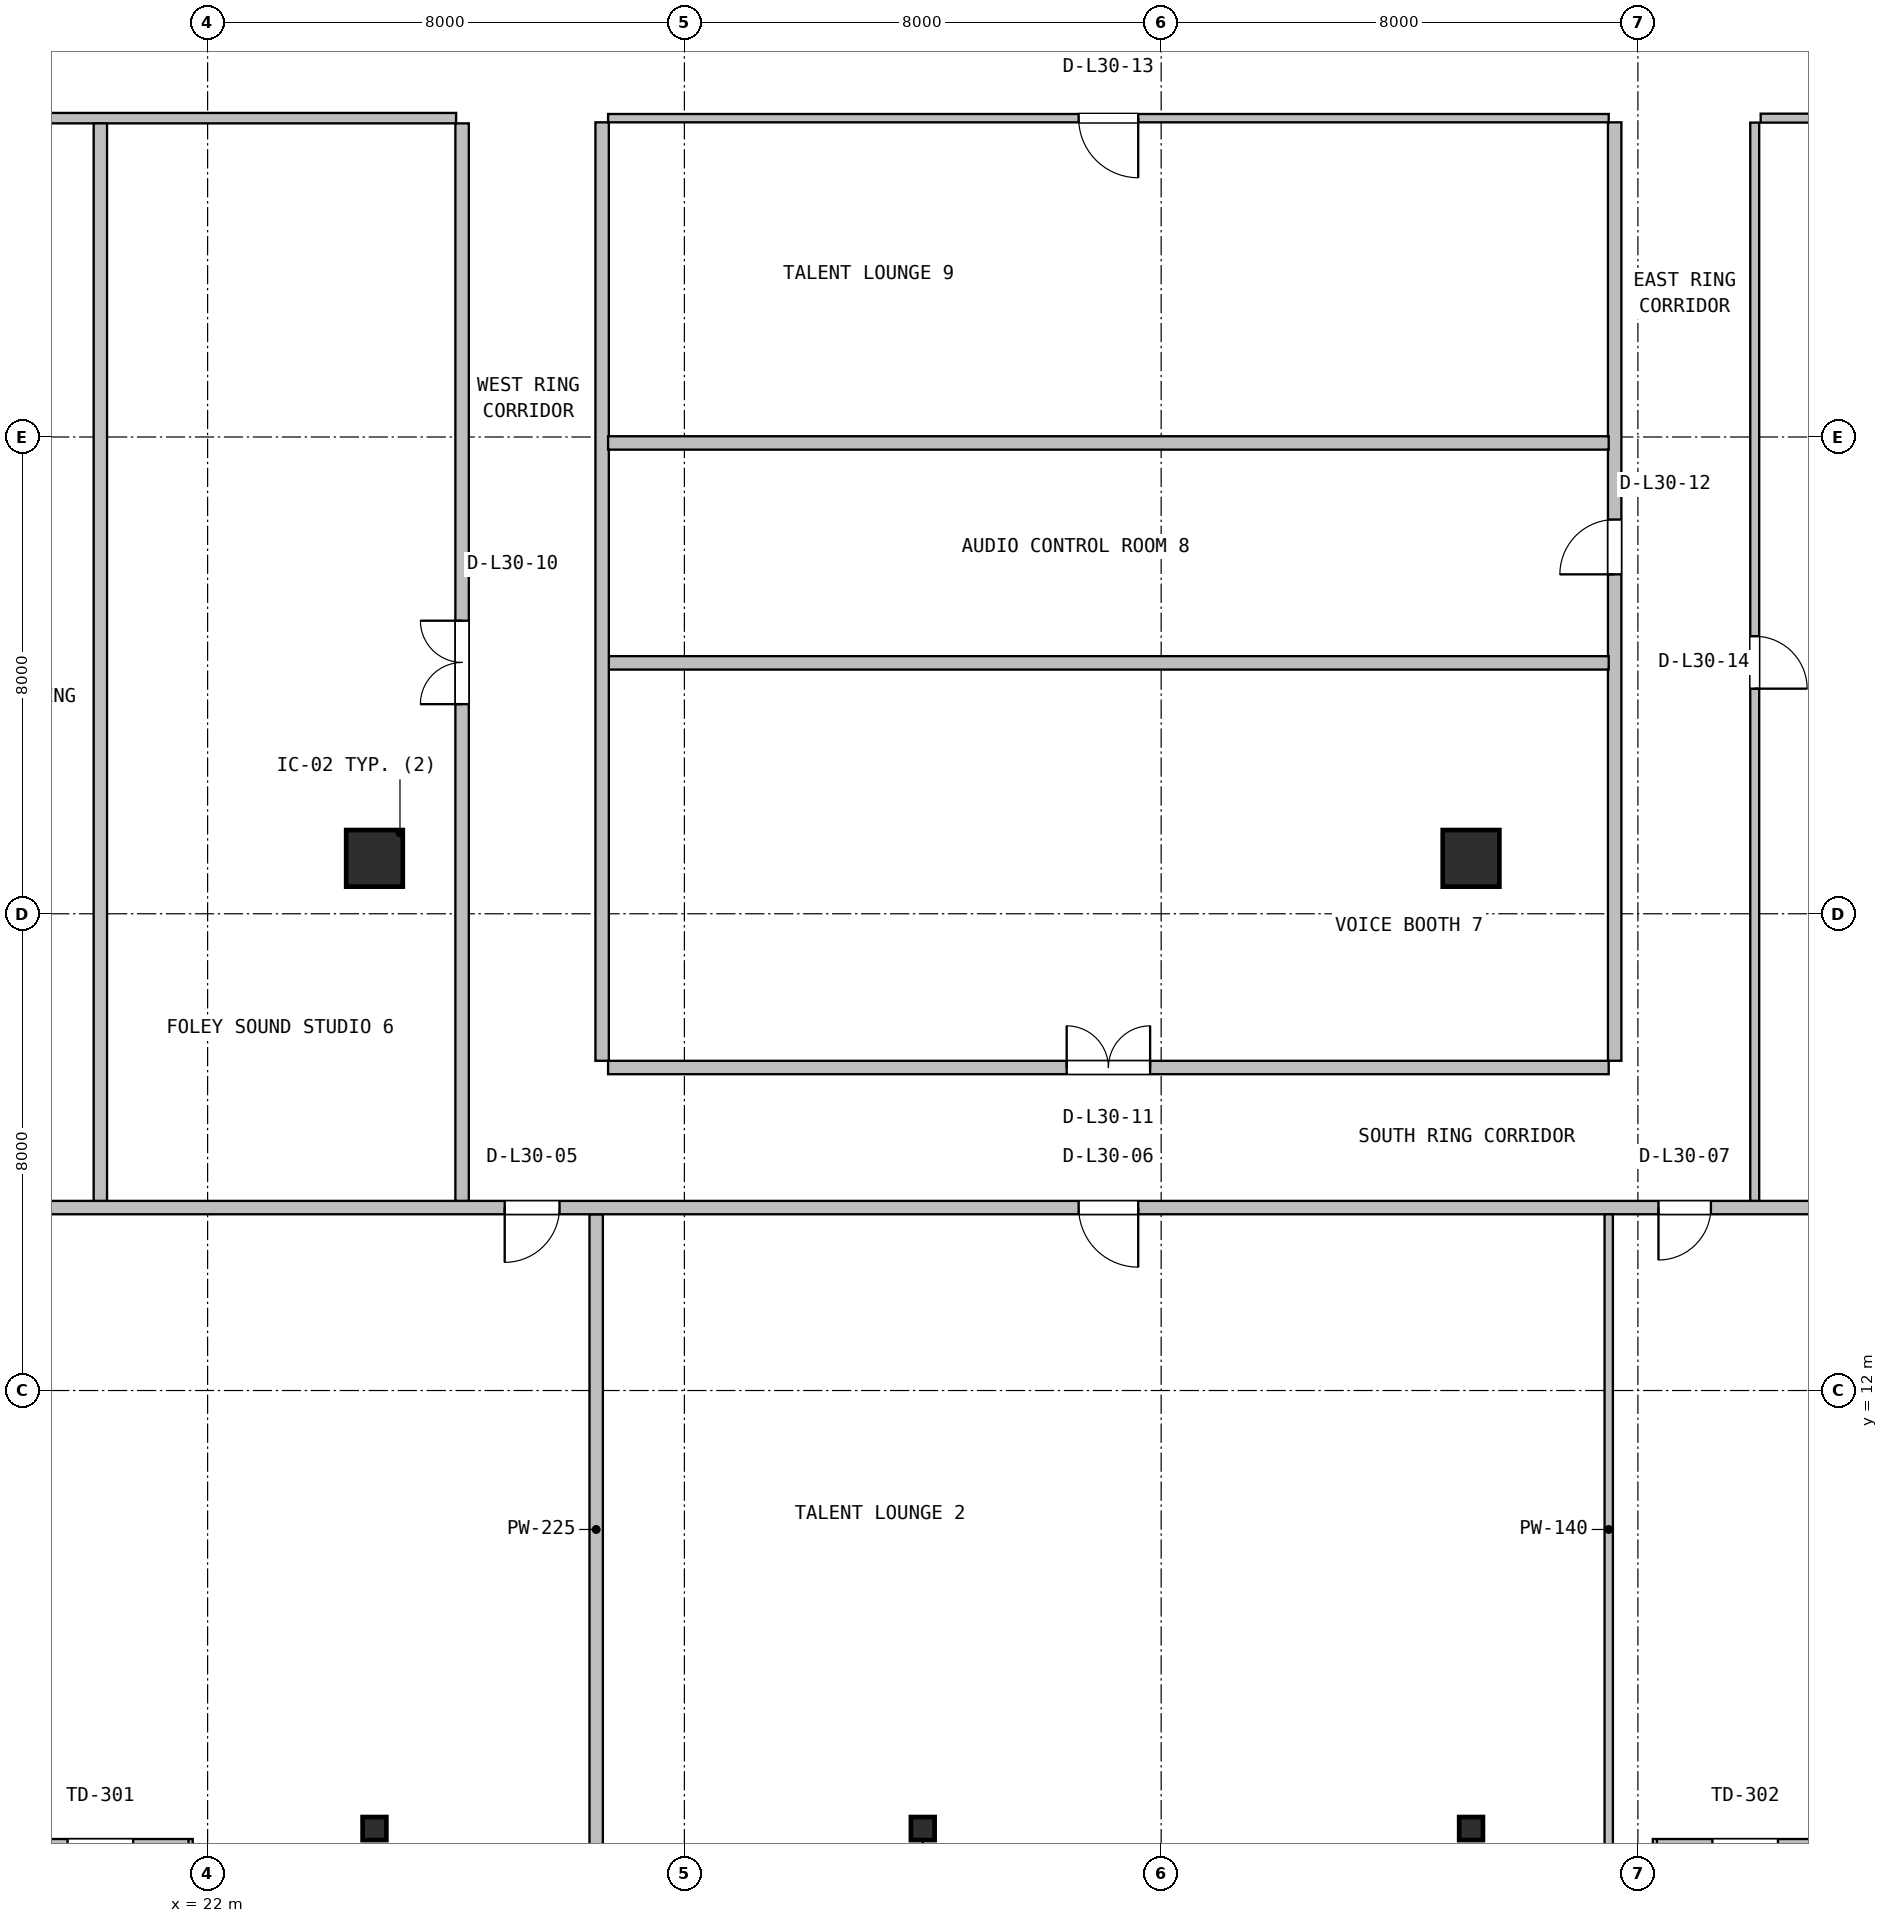
"""IFC4 building model, lengths in metres.
Left out: names, types, materials, properties, quantities, classifications, styles, units other than length and angle.
Written with IfcOpenShell. Run it as: python <this file> out.ifc"""

import sys

from ifc_helpers import new_model, si_unit, direction, frame, frame_2d, origin, origin_2d, place, context, subcontext, project, spatial, rectangle, i_section, extrude, source, transform, mapped, element, fill, save


model = new_model("IFC4")
c1 = context("Model", 3, precision=1e-05, world=origin(), true_north=direction((0.0, 1.0)))
c2 = subcontext(c1, "Body", "Model", "MODEL_VIEW")
j1 = project(units=[si_unit("LENGTHUNIT", "METRE"), si_unit("PLANEANGLEUNIT", "RADIAN")], contexts=[c1])
p1 = place(None, origin())
s1 = spatial("IfcSite", under=j1, at=p1, CompositionType="ELEMENT")
p2 = place(p1, origin())
s2 = spatial("IfcBuilding", under=s1, at=p2, CompositionType="ELEMENT")
p3 = place(p2, frame((0.0, 0.0, 125.8)))
s3 = spatial("IfcBuildingStorey", under=s2, at=p3, CompositionType="ELEMENT", Elevation=125.8)
m1 = source(origin(), c2, "Body", "SweptSolid", [
    extrude(i_section(OverallWidth=0.398, OverallDepth=0.387, WebThickness=0.021, FlangeThickness=0.033, FilletRadius=0.018, at=origin_2d()), origin(), (0.0, 0.0, 1.0), 3.8),
])
for number, where, z_axis, x_axis in (
    (1, (24.8, 4.65, 0.0), (0.0, 0.0, 1.0), (1.0, 0.0, 0.0)),
    (2, (34.0, 4.65, 0.0), (0.0, 0.0, 1.0), (1.0, 0.0, 0.0)),
    (3, (43.2, 4.65, 0.0), (0.0, 0.0, 1.0), (1.0, 0.0, 0.0)),
):
    element("IfcColumn", number, at=place(p3, frame(where, z_axis=z_axis, x_axis=x_axis)), inside=s3, PredefinedType="COLUMN", context=c2, shape_type="MappedRepresentation", body=[
        mapped(m1, transform((0.0, 0.0, 0.0), x_axis=(1.0, 0.0, 0.0), y_axis=(0.0, 1.0, 0.0), z_axis=(0.0, 0.0, 1.0), scale=1.0)),
    ])
m2 = source(origin(), c2, "Body", "SweptSolid", [
    extrude(rectangle(XDim=0.95, YDim=0.95, at=origin_2d()), origin(), (0.0, 0.0, 1.0), 3.8),
])
for number, where, z_axis, x_axis in (
    (4, (24.8, 20.93, 0.0), (0.0, 0.0, 1.0), (1.0, 0.0, 0.0)),
    (5, (43.2, 20.93, 0.0), (0.0, 0.0, 1.0), (1.0, 0.0, 0.0)),
):
    element("IfcColumn", number, at=place(p3, frame(where, z_axis=z_axis, x_axis=x_axis)), inside=s3, PredefinedType="COLUMN", context=c2, shape_type="MappedRepresentation", body=[
        mapped(m2, transform((0.0, 0.0, 0.0), x_axis=(1.0, 0.0, 0.0), y_axis=(0.0, 1.0, 0.0), z_axis=(0.0, 0.0, 1.0), scale=1.0)),
    ])
p4 = place(p3, frame((18.65, 4.35, 0.0), z_axis=(0.0, 0.0, 1.0), x_axis=(1.0, 0.0, 0.0)))
e6 = element("IfcWall", 6, at=p4, inside=s3, PredefinedType="SOLIDWALL", context=c2, shape_type="SweptSolid", body=[
    extrude(rectangle(XDim=3.1, YDim=0.25, at=frame_2d((1.55, 0.0))), origin(), (0.0, 0.0, 1.0), 3.53),
])
p5 = place(p4, frame((1.0, 0.0, 0.0)))
e7 = element("IfcOpeningElement", 7, at=p5, cuts=e6, PredefinedType="OPENING", context=c2, shape_type="SweptSolid", body=[
    extrude(rectangle(XDim=1.1, YDim=2.15, at=frame_2d((0.55, 1.075))), frame((0.0, 0.135, 0.0), z_axis=(0.0, -1.0, 0.0), x_axis=(1.0, 0.0, 0.0)), (0.0, 0.0, 1.0), 0.27),
])
p6 = place(p3, frame((46.25, 4.35, 0.0), z_axis=(0.0, 0.0, 1.0), x_axis=(1.0, 0.0, 0.0)))
e8 = element("IfcWall", 8, at=p6, inside=s3, PredefinedType="SOLIDWALL", context=c2, shape_type="SweptSolid", body=[
    extrude(rectangle(XDim=3.1, YDim=0.25, at=frame_2d((1.55, 0.0))), origin(), (0.0, 0.0, 1.0), 3.53),
])
p7 = place(p6, frame((1.0, 0.0, 0.0)))
e9 = element("IfcOpeningElement", 9, at=p7, cuts=e8, PredefinedType="OPENING", context=c2, shape_type="SweptSolid", body=[
    extrude(rectangle(XDim=1.1, YDim=2.15, at=frame_2d((0.55, 1.075))), frame((0.0, 0.135, 0.0), z_axis=(0.0, -1.0, 0.0), x_axis=(1.0, 0.0, 0.0)), (0.0, 0.0, 1.0), 0.27),
])
p8 = place(p3, frame((28.52, 4.38, 0.0), z_axis=(0.0, 0.0, 1.0), x_axis=(0.0, 1.0, 0.0)))
e10 = element("IfcWall", 10, at=p8, inside=s3, PredefinedType="PARTITIONING", context=c2, shape_type="SweptSolid", body=[
    extrude(rectangle(XDim=10.577, YDim=0.225, at=frame_2d((5.289, 0.0))), origin(), (0.0, 0.0, 1.0), 3.108),
])
p9 = place(p3, frame((4.68, 15.07, 0.0), z_axis=(0.0, 0.0, 1.0), x_axis=(1.0, 0.0, 0.0)))
e11 = element("IfcWall", 11, at=p9, inside=s3, PredefinedType="PARTITIONING", context=c2, shape_type="SweptSolid", body=[
    extrude(rectangle(XDim=58.64, YDim=0.225, at=frame_2d((29.32, 0.0))), origin(), (0.0, 0.0, 1.0), 2.83),
])
p10 = place(p9, frame((22.305, 0.0, 0.0)))
e12 = element("IfcOpeningElement", 12, at=p10, cuts=e11, PredefinedType="OPENING", context=c2, shape_type="SweptSolid", body=[
    extrude(rectangle(XDim=0.92, YDim=2.08, at=frame_2d((0.46, 1.04))), frame((0.0, 0.123, 0.0), z_axis=(0.0, -1.0, 0.0), x_axis=(1.0, 0.0, 0.0)), (0.0, 0.0, 1.0), 0.245),
])
p11 = place(p9, frame((31.935, 0.0, 0.0)))
e13 = element("IfcOpeningElement", 13, at=p11, cuts=e11, PredefinedType="OPENING", context=c2, shape_type="SweptSolid", body=[
    extrude(rectangle(XDim=1.0, YDim=2.1, at=frame_2d((0.5, 1.05))), frame((0.0, 0.123, 0.0), z_axis=(0.0, -1.0, 0.0), x_axis=(1.0, 0.0, 0.0)), (0.0, 0.0, 1.0), 0.245),
])
p12 = place(p9, frame((41.665, 0.0, 0.0)))
e14 = element("IfcOpeningElement", 14, at=p12, cuts=e11, PredefinedType="OPENING", context=c2, shape_type="SweptSolid", body=[
    extrude(rectangle(XDim=0.88, YDim=2.06, at=frame_2d((0.44, 1.03))), frame((0.0, 0.123, 0.0), z_axis=(0.0, -1.0, 0.0), x_axis=(1.0, 0.0, 0.0)), (0.0, 0.0, 1.0), 0.245),
])
p13 = place(p3, frame((45.51, 4.38, 0.0), z_axis=(0.0, 0.0, 1.0), x_axis=(0.0, 1.0, 0.0)))
e15 = element("IfcWall", 15, at=p13, inside=s3, PredefinedType="PARTITIONING", context=c2, shape_type="SweptSolid", body=[
    extrude(rectangle(XDim=10.577, YDim=0.14, at=frame_2d((5.289, 0.0))), origin(), (0.0, 0.0, 1.0), 3.108),
])
p14 = place(p3, frame((4.68, 33.35, 0.0), z_axis=(0.0, 0.0, 1.0), x_axis=(1.0, 0.0, 0.0)))
e16 = element("IfcWall", 16, at=p14, inside=s3, PredefinedType="PARTITIONING", context=c2, shape_type="SweptSolid", body=[
    extrude(rectangle(XDim=21.49, YDim=0.175, at=frame_2d((10.745, 0.0))), origin(), (0.0, 0.0, 1.0), 2.83),
])
p15 = place(p14, frame((7.04, 0.0, 0.0)))
e17 = element("IfcOpeningElement", 17, at=p15, cuts=e16, PredefinedType="OPENING", context=c2, shape_type="SweptSolid", body=[
    extrude(rectangle(XDim=1.05, YDim=2.1, at=frame_2d((0.525, 1.05))), frame((0.0, 0.098, 0.0), z_axis=(0.0, -1.0, 0.0), x_axis=(1.0, 0.0, 0.0)), (0.0, 0.0, 1.0), 0.195),
])
p16 = place(p14, frame((12.79, 0.0, 0.0)))
e18 = element("IfcOpeningElement", 18, at=p16, cuts=e16, PredefinedType="OPENING", context=c2, shape_type="SweptSolid", body=[
    extrude(rectangle(XDim=1.4, YDim=2.12, at=frame_2d((0.7, 1.06))), frame((0.0, 0.098, 0.0), z_axis=(0.0, -1.0, 0.0), x_axis=(1.0, 0.0, 0.0)), (0.0, 0.0, 1.0), 0.195),
])
p17 = place(p3, frame((20.2, 15.183, 0.0), z_axis=(0.0, 0.0, 1.0), x_axis=(0.0, 1.0, 0.0)))
e19 = element("IfcWall", 19, at=p17, inside=s3, PredefinedType="PARTITIONING", context=c2, shape_type="SweptSolid", body=[
    extrude(rectangle(XDim=18.08, YDim=0.225, at=frame_2d((9.04, 0.0))), origin(), (0.0, 0.0, 1.0), 3.222),
])
p18 = place(p3, frame((26.27, 15.183, 0.0), z_axis=(0.0, 0.0, 1.0), x_axis=(0.0, 1.0, 0.0)))
e20 = element("IfcWall", 20, at=p18, inside=s3, PredefinedType="PARTITIONING", context=c2, shape_type="SweptSolid", body=[
    extrude(rectangle(XDim=18.08, YDim=0.225, at=frame_2d((9.04, 0.0))), origin(), (0.0, 0.0, 1.0), 2.83),
])
p19 = place(p18, frame((8.334, 0.0, 0.0)))
e21 = element("IfcOpeningElement", 21, at=p19, cuts=e20, PredefinedType="OPENING", context=c2, shape_type="SweptSolid", body=[
    extrude(rectangle(XDim=1.4, YDim=2.12, at=frame_2d((0.7, 1.06))), frame((0.0, 0.123, 0.0), z_axis=(0.0, -1.0, 0.0), x_axis=(1.0, 0.0, 0.0)), (0.0, 0.0, 1.0), 0.245),
])
p20 = place(p3, frame((28.72, 17.42, 0.0), z_axis=(0.0, 0.0, 1.0), x_axis=(1.0, 0.0, 0.0)))
e22 = element("IfcWall", 22, at=p20, inside=s3, PredefinedType="PARTITIONING", context=c2, shape_type="SweptSolid", body=[
    extrude(rectangle(XDim=16.79, YDim=0.225, at=frame_2d((8.395, 0.0))), origin(), (0.0, 0.0, 1.0), 2.83),
])
p21 = place(p20, frame((7.695, 0.0, 0.0)))
e23 = element("IfcOpeningElement", 23, at=p21, cuts=e22, PredefinedType="OPENING", context=c2, shape_type="SweptSolid", body=[
    extrude(rectangle(XDim=1.4, YDim=2.12, at=frame_2d((0.7, 1.06))), frame((0.0, 0.123, 0.0), z_axis=(0.0, -1.0, 0.0), x_axis=(1.0, 0.0, 0.0)), (0.0, 0.0, 1.0), 0.245),
])
p22 = place(p3, frame((45.61, 17.533, 0.0), z_axis=(0.0, 0.0, 1.0), x_axis=(0.0, 1.0, 0.0)))
e24 = element("IfcWall", 24, at=p22, inside=s3, PredefinedType="PARTITIONING", context=c2, shape_type="SweptSolid", body=[
    extrude(rectangle(XDim=15.747, YDim=0.225, at=frame_2d((7.874, 0.0))), origin(), (0.0, 0.0, 1.0), 3.222),
])
p23 = place(p22, frame((8.162, 0.0, 0.0)))
e25 = element("IfcOpeningElement", 25, at=p23, cuts=e24, PredefinedType="OPENING", context=c2, shape_type="SweptSolid", body=[
    extrude(rectangle(XDim=0.92, YDim=2.08, at=frame_2d((0.46, 1.04))), frame((0.0, 0.123, 0.0), z_axis=(0.0, -1.0, 0.0), x_axis=(1.0, 0.0, 0.0)), (0.0, 0.0, 1.0), 0.245),
])
p24 = place(p3, frame((28.72, 24.21, 0.0), z_axis=(0.0, 0.0, 1.0), x_axis=(1.0, 0.0, 0.0)))
e26 = element("IfcWall", 26, at=p24, inside=s3, PredefinedType="PARTITIONING", context=c2, shape_type="SweptSolid", body=[
    extrude(rectangle(XDim=16.79, YDim=0.225, at=frame_2d((8.395, 0.0))), origin(), (0.0, 0.0, 1.0), 2.83),
])
p25 = place(p3, frame((28.62, 17.533, 0.0), z_axis=(0.0, 0.0, 1.0), x_axis=(0.0, 1.0, 0.0)))
e27 = element("IfcWall", 27, at=p25, inside=s3, PredefinedType="PARTITIONING", context=c2, shape_type="SweptSolid", body=[
    extrude(rectangle(XDim=15.747, YDim=0.225, at=frame_2d((7.874, 0.0))), origin(), (0.0, 0.0, 1.0), 2.83),
])
p26 = place(p3, frame((28.72, 27.9, 0.0), z_axis=(0.0, 0.0, 1.0), x_axis=(1.0, 0.0, 0.0)))
e28 = element("IfcWall", 28, at=p26, inside=s3, PredefinedType="PARTITIONING", context=c2, shape_type="SweptSolid", body=[
    extrude(rectangle(XDim=16.79, YDim=0.225, at=frame_2d((8.395, 0.0))), origin(), (0.0, 0.0, 1.0), 2.83),
])
p27 = place(p3, frame((28.72, 33.35, 0.0), z_axis=(0.0, 0.0, 1.0), x_axis=(1.0, 0.0, 0.0)))
e29 = element("IfcWall", 29, at=p27, inside=s3, PredefinedType="PARTITIONING", context=c2, shape_type="SweptSolid", body=[
    extrude(rectangle(XDim=16.79, YDim=0.14, at=frame_2d((8.395, 0.0))), origin(), (0.0, 0.0, 1.0), 2.83),
])
p28 = place(p27, frame((7.895, 0.0, 0.0)))
e30 = element("IfcOpeningElement", 30, at=p28, cuts=e29, PredefinedType="OPENING", context=c2, shape_type="SweptSolid", body=[
    extrude(rectangle(XDim=1.0, YDim=2.1, at=frame_2d((0.5, 1.05))), frame((0.0, 0.08, 0.0), z_axis=(0.0, -1.0, 0.0), x_axis=(1.0, 0.0, 0.0)), (0.0, 0.0, 1.0), 0.16),
])
p29 = place(p3, frame((48.06, 33.35, 0.0), z_axis=(0.0, 0.0, 1.0), x_axis=(1.0, 0.0, 0.0)))
e31 = element("IfcWall", 31, at=p29, inside=s3, PredefinedType="PARTITIONING", context=c2, shape_type="SweptSolid", body=[
    extrude(rectangle(XDim=15.26, YDim=0.15, at=frame_2d((7.63, 0.0))), origin(), (0.0, 0.0, 1.0), 3.108),
])
p30 = place(p29, frame((8.815, 0.0, 0.0)))
e32 = element("IfcOpeningElement", 32, at=p30, cuts=e31, PredefinedType="OPENING", context=c2, shape_type="SweptSolid", body=[
    extrude(rectangle(XDim=1.05, YDim=2.1, at=frame_2d((0.525, 1.05))), frame((0.0, 0.085, 0.0), z_axis=(0.0, -1.0, 0.0), x_axis=(1.0, 0.0, 0.0)), (0.0, 0.0, 1.0), 0.17),
])
p31 = place(p3, frame((47.96, 15.183, 0.0), z_axis=(0.0, 0.0, 1.0), x_axis=(0.0, 1.0, 0.0)))
e33 = element("IfcWall", 33, at=p31, inside=s3, PredefinedType="PARTITIONING", context=c2, shape_type="SweptSolid", body=[
    extrude(rectangle(XDim=18.092, YDim=0.15, at=frame_2d((9.046, 0.0))), origin(), (0.0, 0.0, 1.0), 3.222),
])
p32 = place(p31, frame((8.594, 0.0, 0.0)))
e34 = element("IfcOpeningElement", 34, at=p32, cuts=e33, PredefinedType="OPENING", context=c2, shape_type="SweptSolid", body=[
    extrude(rectangle(XDim=0.88, YDim=2.06, at=frame_2d((0.44, 1.03))), frame((0.0, 0.085, 0.0), z_axis=(0.0, -1.0, 0.0), x_axis=(1.0, 0.0, 0.0)), (0.0, 0.0, 1.0), 0.17),
])
m3 = source(origin(), c2, "Body", "SweptSolid", [
    extrude(rectangle(XDim=0.92, YDim=2.08, at=frame_2d((0.46, 1.04))), frame((0.0, 0.025, 0.0), z_axis=(0.0, -1.0, 0.0), x_axis=(1.0, 0.0, 0.0)), (0.0, 0.0, 1.0), 0.05),
])
p33 = place(p10, frame((0.92, 0.0, 0.0), z_axis=(0.0, 0.0, 1.0), x_axis=(-1.0, 0.0, 0.0)))
e35 = element("IfcDoor", 35, at=p33, inside=s3, OperationType="SINGLE_SWING_LEFT", PredefinedType="DOOR", context=c2, shape_type="MappedRepresentation", body=[
    mapped(m3, transform((0.0, 0.0, 0.0), x_axis=(1.0, 0.0, 0.0), y_axis=(0.0, 1.0, 0.0), z_axis=(0.0, 0.0, 1.0), scale=1.0)),
])
fill(e12, e35)
m4 = source(origin(), c2, "Body", "SweptSolid", [
    extrude(rectangle(XDim=1.0, YDim=2.1, at=frame_2d((0.5, 1.05))), frame((0.0, 0.025, 0.0), z_axis=(0.0, -1.0, 0.0), x_axis=(1.0, 0.0, 0.0)), (0.0, 0.0, 1.0), 0.05),
])
p34 = place(p11, frame((1.0, 0.0, 0.0), z_axis=(0.0, 0.0, 1.0), x_axis=(-1.0, 0.0, 0.0)))
e36 = element("IfcDoor", 36, at=p34, inside=s3, OperationType="SINGLE_SWING_RIGHT", PredefinedType="DOOR", context=c2, shape_type="MappedRepresentation", body=[
    mapped(m4, transform((0.0, 0.0, 0.0), x_axis=(1.0, 0.0, 0.0), y_axis=(0.0, 1.0, 0.0), z_axis=(0.0, 0.0, 1.0), scale=1.0)),
])
fill(e13, e36)
m5 = source(origin(), c2, "Body", "SweptSolid", [
    extrude(rectangle(XDim=0.88, YDim=2.06, at=frame_2d((0.44, 1.03))), frame((0.0, 0.025, 0.0), z_axis=(0.0, -1.0, 0.0), x_axis=(1.0, 0.0, 0.0)), (0.0, 0.0, 1.0), 0.05),
])
p35 = place(p12, frame((0.88, 0.0, 0.0), z_axis=(0.0, 0.0, 1.0), x_axis=(-1.0, 0.0, 0.0)))
e37 = element("IfcDoor", 37, at=p35, inside=s3, OperationType="SINGLE_SWING_LEFT", PredefinedType="DOOR", context=c2, shape_type="MappedRepresentation", body=[
    mapped(m5, transform((0.0, 0.0, 0.0), x_axis=(1.0, 0.0, 0.0), y_axis=(0.0, 1.0, 0.0), z_axis=(0.0, 0.0, 1.0), scale=1.0)),
])
fill(e14, e37)
m6 = source(origin(), c2, "Body", "SweptSolid", [
    extrude(rectangle(XDim=1.4, YDim=2.12, at=frame_2d((0.7, 1.06))), frame((0.0, 0.025, 0.0), z_axis=(0.0, -1.0, 0.0), x_axis=(1.0, 0.0, 0.0)), (0.0, 0.0, 1.0), 0.05),
])
p36 = place(p19, origin())
e38 = element("IfcDoor", 38, at=p36, inside=s3, OperationType="DOUBLE_DOOR_SINGLE_SWING", PredefinedType="DOOR", context=c2, shape_type="MappedRepresentation", body=[
    mapped(m6, transform((0.0, 0.0, 0.0), x_axis=(1.0, 0.0, 0.0), y_axis=(0.0, 1.0, 0.0), z_axis=(0.0, 0.0, 1.0), scale=1.0)),
])
fill(e21, e38)
p37 = place(p21, origin())
e39 = element("IfcDoor", 39, at=p37, inside=s3, OperationType="DOUBLE_DOOR_SINGLE_SWING", PredefinedType="DOOR", context=c2, shape_type="MappedRepresentation", body=[
    mapped(m6, transform((0.0, 0.0, 0.0), x_axis=(1.0, 0.0, 0.0), y_axis=(0.0, 1.0, 0.0), z_axis=(0.0, 0.0, 1.0), scale=1.0)),
])
fill(e23, e39)
p38 = place(p23, origin())
e40 = element("IfcDoor", 40, at=p38, inside=s3, OperationType="SINGLE_SWING_LEFT", PredefinedType="DOOR", context=c2, shape_type="MappedRepresentation", body=[
    mapped(m3, transform((0.0, 0.0, 0.0), x_axis=(1.0, 0.0, 0.0), y_axis=(0.0, 1.0, 0.0), z_axis=(0.0, 0.0, 1.0), scale=1.0)),
])
fill(e25, e40)
p39 = place(p28, frame((1.0, 0.0, 0.0), z_axis=(0.0, 0.0, 1.0), x_axis=(-1.0, 0.0, 0.0)))
e41 = element("IfcDoor", 41, at=p39, inside=s3, OperationType="SINGLE_SWING_RIGHT", PredefinedType="DOOR", context=c2, shape_type="MappedRepresentation", body=[
    mapped(m4, transform((0.0, 0.0, 0.0), x_axis=(1.0, 0.0, 0.0), y_axis=(0.0, 1.0, 0.0), z_axis=(0.0, 0.0, 1.0), scale=1.0)),
])
fill(e30, e41)
p40 = place(p32, frame((0.88, 0.0, 0.0), z_axis=(0.0, 0.0, 1.0), x_axis=(-1.0, 0.0, 0.0)))
e42 = element("IfcDoor", 42, at=p40, inside=s3, OperationType="SINGLE_SWING_LEFT", PredefinedType="DOOR", context=c2, shape_type="MappedRepresentation", body=[
    mapped(m5, transform((0.0, 0.0, 0.0), x_axis=(1.0, 0.0, 0.0), y_axis=(0.0, 1.0, 0.0), z_axis=(0.0, 0.0, 1.0), scale=1.0)),
])
fill(e34, e42)
save(model, sys.argv[1])
